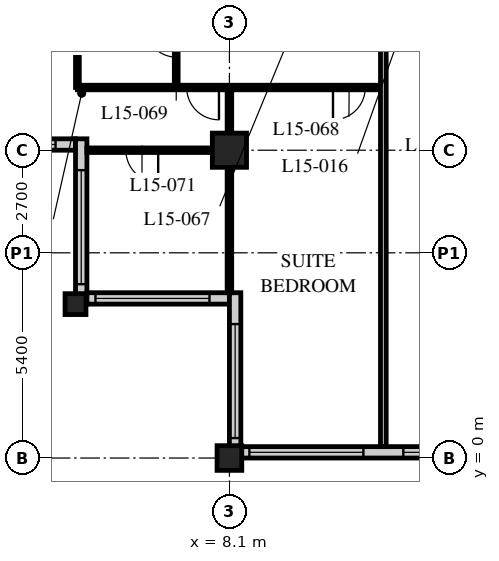
"""IFC4 building model, lengths in metres.
Left out: names, types, materials, properties, quantities, classifications, styles, units other than length and angle.
Written with IfcOpenShell. Run it as: python <this file> out.ifc"""

import sys

from ifc_helpers import new_model, si_unit, direction, frame, frame_2d, origin, origin_2d, place, context, subcontext, project, spatial, rectangle, hollow_rectangle, extrude, element, fill, save


model = new_model("IFC4")
c1 = context("Model", 3, precision=1e-05, world=origin(), true_north=direction((0.0, 1.0)))
c2 = subcontext(c1, "Body", "Model", "MODEL_VIEW")
j1 = project(units=[si_unit("LENGTHUNIT", "METRE"), si_unit("PLANEANGLEUNIT", "RADIAN")], contexts=[c1])
p1 = place(None, origin())
s1 = spatial("IfcSite", under=j1, at=p1, CompositionType="ELEMENT")
p2 = place(p1, origin())
s2 = spatial("IfcBuilding", under=s1, at=p2, CompositionType="ELEMENT")
p3 = place(p2, frame((0.0, 0.0, 63.6)))
s3 = spatial("IfcBuildingStorey", under=s2, at=p3, CompositionType="ELEMENT", Elevation=63.6)
p4 = place(p3, frame((4.05, 4.05, 0.0), z_axis=(0.0, 0.0, 1.0), x_axis=(1.0, 0.0, 0.0)))
e1 = element("IfcColumn", 1, at=p4, inside=s3, PredefinedType="COLUMN", context=c2, shape_type="SweptSolid", body=[
    extrude(hollow_rectangle(XDim=0.55, YDim=0.55, WallThickness=0.05, at=origin_2d()), origin(), (0.0, 0.0, 1.0), 3.4),
])
p5 = place(p3, frame((8.1, 0.0, 0.0), z_axis=(0.0, 0.0, 1.0), x_axis=(1.0, 0.0, 0.0)))
e2 = element("IfcColumn", 2, at=p5, inside=s3, PredefinedType="COLUMN", context=c2, shape_type="SweptSolid", body=[
    extrude(hollow_rectangle(XDim=0.65, YDim=0.65, WallThickness=0.05, at=origin_2d()), origin(), (0.0, 0.0, 1.0), 3.4),
])
p6 = place(p3, frame((8.1, 8.1, 0.0), z_axis=(0.0, 0.0, 1.0), x_axis=(1.0, 0.0, 0.0)))
e3 = element("IfcColumn", 3, at=p6, inside=s3, PredefinedType="COLUMN", context=c2, shape_type="SweptSolid", body=[
    extrude(hollow_rectangle(XDim=0.9, YDim=0.9, WallThickness=0.09, at=origin_2d()), origin(), (0.0, 0.0, 1.0), 3.4),
])
p7 = place(p3, frame((8.4, 0.15, 0.0), z_axis=(0.0, 0.0, 1.0), x_axis=(1.0, 0.0, 0.0)))
e4 = element("IfcWall", 4, at=p7, inside=s3, PredefinedType="SOLIDWALL", context=c2, shape_type="SweptSolid", body=[
    extrude(rectangle(XDim=40.2, YDim=0.3, at=frame_2d((20.1, 0.0))), origin(), (0.0, 0.0, 1.0), 3.19),
])
p8 = place(p7, frame((0.225, 0.0, 0.9)))
e5 = element("IfcOpeningElement", 5, at=p8, cuts=e4, PredefinedType="OPENING", context=c2, shape_type="SweptSolid", body=[
    extrude(rectangle(XDim=3.0, YDim=2.0, at=frame_2d((1.5, 1.0))), frame((0.0, 0.16, 0.0), z_axis=(0.0, -1.0, 0.0), x_axis=(1.0, 0.0, 0.0)), (0.0, 0.0, 1.0), 0.32),
])
p9 = place(p7, frame((4.275, 0.0, 0.9)))
e6 = element("IfcOpeningElement", 6, at=p9, cuts=e4, PredefinedType="OPENING", context=c2, shape_type="SweptSolid", body=[
    extrude(rectangle(XDim=3.0, YDim=2.0, at=frame_2d((1.5, 1.0))), frame((0.0, 0.16, 0.0), z_axis=(0.0, -1.0, 0.0), x_axis=(1.0, 0.0, 0.0)), (0.0, 0.0, 1.0), 0.32),
])
p10 = place(p7, frame((8.325, 0.0, 0.9)))
e7 = element("IfcOpeningElement", 7, at=p10, cuts=e4, PredefinedType="OPENING", context=c2, shape_type="SweptSolid", body=[
    extrude(rectangle(XDim=3.0, YDim=2.0, at=frame_2d((1.5, 1.0))), frame((0.0, 0.16, 0.0), z_axis=(0.0, -1.0, 0.0), x_axis=(1.0, 0.0, 0.0)), (0.0, 0.0, 1.0), 0.32),
])
p11 = place(p7, frame((12.375, 0.0, 0.9)))
e8 = element("IfcOpeningElement", 8, at=p11, cuts=e4, PredefinedType="OPENING", context=c2, shape_type="SweptSolid", body=[
    extrude(rectangle(XDim=3.0, YDim=2.0, at=frame_2d((1.5, 1.0))), frame((0.0, 0.16, 0.0), z_axis=(0.0, -1.0, 0.0), x_axis=(1.0, 0.0, 0.0)), (0.0, 0.0, 1.0), 0.32),
])
p12 = place(p7, frame((16.425, 0.0, 0.9)))
e9 = element("IfcOpeningElement", 9, at=p12, cuts=e4, PredefinedType="OPENING", context=c2, shape_type="SweptSolid", body=[
    extrude(rectangle(XDim=3.0, YDim=2.0, at=frame_2d((1.5, 1.0))), frame((0.0, 0.16, 0.0), z_axis=(0.0, -1.0, 0.0), x_axis=(1.0, 0.0, 0.0)), (0.0, 0.0, 1.0), 0.32),
])
p13 = place(p7, frame((20.475, 0.0, 0.9)))
e10 = element("IfcOpeningElement", 10, at=p13, cuts=e4, PredefinedType="OPENING", context=c2, shape_type="SweptSolid", body=[
    extrude(rectangle(XDim=3.0, YDim=2.0, at=frame_2d((1.5, 1.0))), frame((0.0, 0.16, 0.0), z_axis=(0.0, -1.0, 0.0), x_axis=(1.0, 0.0, 0.0)), (0.0, 0.0, 1.0), 0.32),
])
p14 = place(p7, frame((24.525, 0.0, 0.9)))
e11 = element("IfcOpeningElement", 11, at=p14, cuts=e4, PredefinedType="OPENING", context=c2, shape_type="SweptSolid", body=[
    extrude(rectangle(XDim=3.0, YDim=2.0, at=frame_2d((1.5, 1.0))), frame((0.0, 0.16, 0.0), z_axis=(0.0, -1.0, 0.0), x_axis=(1.0, 0.0, 0.0)), (0.0, 0.0, 1.0), 0.32),
])
p15 = place(p7, frame((28.575, 0.0, 0.9)))
e12 = element("IfcOpeningElement", 12, at=p15, cuts=e4, PredefinedType="OPENING", context=c2, shape_type="SweptSolid", body=[
    extrude(rectangle(XDim=3.0, YDim=2.0, at=frame_2d((1.5, 1.0))), frame((0.0, 0.16, 0.0), z_axis=(0.0, -1.0, 0.0), x_axis=(1.0, 0.0, 0.0)), (0.0, 0.0, 1.0), 0.32),
])
p16 = place(p7, frame((32.625, 0.0, 0.9)))
e13 = element("IfcOpeningElement", 13, at=p16, cuts=e4, PredefinedType="OPENING", context=c2, shape_type="SweptSolid", body=[
    extrude(rectangle(XDim=3.0, YDim=2.0, at=frame_2d((1.5, 1.0))), frame((0.0, 0.16, 0.0), z_axis=(0.0, -1.0, 0.0), x_axis=(1.0, 0.0, 0.0)), (0.0, 0.0, 1.0), 0.32),
])
p17 = place(p7, frame((36.675, 0.0, 0.9)))
e14 = element("IfcOpeningElement", 14, at=p17, cuts=e4, PredefinedType="OPENING", context=c2, shape_type="SweptSolid", body=[
    extrude(rectangle(XDim=3.0, YDim=2.0, at=frame_2d((1.5, 1.0))), frame((0.0, 0.16, 0.0), z_axis=(0.0, -1.0, 0.0), x_axis=(1.0, 0.0, 0.0)), (0.0, 0.0, 1.0), 0.32),
])
p18 = place(p3, frame((0.3, 8.25, 0.0), z_axis=(0.0, 0.0, 1.0), x_axis=(1.0, 0.0, 0.0)))
e15 = element("IfcWall", 15, at=p18, inside=s3, PredefinedType="SOLIDWALL", context=c2, shape_type="SweptSolid", body=[
    extrude(rectangle(XDim=3.75, YDim=0.3, at=frame_2d((1.875, 0.0))), origin(), (0.0, 0.0, 1.0), 3.19),
])
p19 = place(p18, frame((0.225, 0.0, 0.9)))
e16 = element("IfcOpeningElement", 16, at=p19, cuts=e15, PredefinedType="OPENING", context=c2, shape_type="SweptSolid", body=[
    extrude(rectangle(XDim=3.0, YDim=1.5, at=frame_2d((1.5, 0.75))), frame((0.0, 0.16, 0.0), z_axis=(0.0, -1.0, 0.0), x_axis=(1.0, 0.0, 0.0)), (0.0, 0.0, 1.0), 0.32),
])
p20 = place(p3, frame((4.2, 8.4, 0.0), z_axis=(0.0, 0.0, 1.0), x_axis=(0.0, -1.0, 0.0)))
e17 = element("IfcWall", 17, at=p20, inside=s3, PredefinedType="SOLIDWALL", context=c2, shape_type="SweptSolid", body=[
    extrude(rectangle(XDim=4.35, YDim=0.3, at=frame_2d((2.175, 0.0))), origin(), (0.0, 0.0, 1.0), 3.19),
])
p21 = place(p20, frame((0.825, 0.0, 0.9)))
e18 = element("IfcOpeningElement", 18, at=p21, cuts=e17, PredefinedType="OPENING", context=c2, shape_type="SweptSolid", body=[
    extrude(rectangle(XDim=3.0, YDim=1.5, at=frame_2d((1.5, 0.75))), frame((0.0, 0.16, 0.0), z_axis=(0.0, -1.0, 0.0), x_axis=(1.0, 0.0, 0.0)), (0.0, 0.0, 1.0), 0.32),
])
p22 = place(p3, frame((4.35, 4.2, 0.0), z_axis=(0.0, 0.0, 1.0), x_axis=(1.0, 0.0, 0.0)))
e19 = element("IfcWall", 19, at=p22, inside=s3, PredefinedType="SOLIDWALL", context=c2, shape_type="SweptSolid", body=[
    extrude(rectangle(XDim=3.75, YDim=0.3, at=frame_2d((1.875, 0.0))), origin(), (0.0, 0.0, 1.0), 3.19),
])
p23 = place(p22, frame((0.225, 0.0, 0.9)))
e20 = element("IfcOpeningElement", 20, at=p23, cuts=e19, PredefinedType="OPENING", context=c2, shape_type="SweptSolid", body=[
    extrude(rectangle(XDim=3.0, YDim=1.5, at=frame_2d((1.5, 0.75))), frame((0.0, 0.16, 0.0), z_axis=(0.0, -1.0, 0.0), x_axis=(1.0, 0.0, 0.0)), (0.0, 0.0, 1.0), 0.32),
])
p24 = place(p3, frame((8.25, 4.35, 0.0), z_axis=(0.0, 0.0, 1.0), x_axis=(0.0, -1.0, 0.0)))
e21 = element("IfcWall", 21, at=p24, inside=s3, PredefinedType="SOLIDWALL", context=c2, shape_type="SweptSolid", body=[
    extrude(rectangle(XDim=4.35, YDim=0.3, at=frame_2d((2.175, 0.0))), origin(), (0.0, 0.0, 1.0), 3.19),
])
p25 = place(p24, frame((0.825, 0.0, 0.9)))
e22 = element("IfcOpeningElement", 22, at=p25, cuts=e21, PredefinedType="OPENING", context=c2, shape_type="SweptSolid", body=[
    extrude(rectangle(XDim=3.0, YDim=1.5, at=frame_2d((1.5, 0.75))), frame((0.0, 0.16, 0.0), z_axis=(0.0, -1.0, 0.0), x_axis=(1.0, 0.0, 0.0)), (0.0, 0.0, 1.0), 0.32),
])
p26 = place(p3, frame((6.7, 12.15, 0.0), z_axis=(0.0, 0.0, 1.0), x_axis=(0.0, -1.0, 0.0)))
e23 = element("IfcWall", 23, at=p26, inside=s3, PredefinedType="PARTITIONING", context=c2, shape_type="SweptSolid", body=[
    extrude(rectangle(XDim=2.4, YDim=0.1, at=frame_2d((1.2, 0.0))), origin(), (0.0, 0.0, 1.0), 3.19),
])
p27 = place(p26, frame((0.8, 0.0, 0.0)))
e24 = element("IfcOpeningElement", 24, at=p27, cuts=e23, PredefinedType="OPENING", context=c2, shape_type="SweptSolid", body=[
    extrude(rectangle(XDim=0.8, YDim=2.1, at=frame_2d((0.4, 1.05))), frame((0.0, 0.06, 0.0), z_axis=(0.0, -1.0, 0.0), x_axis=(1.0, 0.0, 0.0)), (0.0, 0.0, 1.0), 0.12),
])
p28 = place(p3, frame((4.1, 12.15, 0.0), z_axis=(0.0, 0.0, 1.0), x_axis=(0.0, -1.0, 0.0)))
e25 = element("IfcWall", 25, at=p28, inside=s3, PredefinedType="PARTITIONING", context=c2, shape_type="SweptSolid", body=[
    extrude(rectangle(XDim=2.4, YDim=0.1, at=frame_2d((1.2, 0.0))), origin(), (0.0, 0.0, 1.0), 3.19),
])
p29 = place(p3, frame((4.1, 9.75, 0.0), z_axis=(0.0, 0.0, 1.0), x_axis=(1.0, 0.0, 0.0)))
e26 = element("IfcWall", 26, at=p29, inside=s3, PredefinedType="PARTITIONING", context=c2, shape_type="SweptSolid", body=[
    extrude(rectangle(XDim=8.05, YDim=0.12, at=frame_2d((4.025, 0.0))), origin(), (0.0, 0.0, 1.0), 3.19),
])
p30 = place(p29, frame((6.725, 0.0, 0.0)))
e27 = element("IfcOpeningElement", 27, at=p30, cuts=e26, PredefinedType="OPENING", context=c2, shape_type="SweptSolid", body=[
    extrude(rectangle(XDim=0.85, YDim=2.1, at=frame_2d((0.425, 1.05))), frame((0.0, 0.07, 0.0), z_axis=(0.0, -1.0, 0.0), x_axis=(1.0, 0.0, 0.0)), (0.0, 0.0, 1.0), 0.14),
])
p31 = place(p29, frame((2.875, 0.0, 0.0)))
e28 = element("IfcOpeningElement", 28, at=p31, cuts=e26, PredefinedType="OPENING", context=c2, shape_type="SweptSolid", body=[
    extrude(rectangle(XDim=0.85, YDim=2.1, at=frame_2d((0.425, 1.05))), frame((0.0, 0.07, 0.0), z_axis=(0.0, -1.0, 0.0), x_axis=(1.0, 0.0, 0.0)), (0.0, 0.0, 1.0), 0.14),
])
p32 = place(p3, frame((8.1, 9.75, 0.0), z_axis=(0.0, 0.0, 1.0), x_axis=(0.0, -1.0, 0.0)))
e29 = element("IfcWall", 29, at=p32, inside=s3, PredefinedType="PARTITIONING", context=c2, shape_type="SweptSolid", body=[
    extrude(rectangle(XDim=5.4, YDim=0.12, at=frame_2d((2.7, 0.0))), origin(), (0.0, 0.0, 1.0), 2.578),
])
p33 = place(p3, frame((8.1, 8.1, 0.0), z_axis=(0.0, 0.0, 1.0), x_axis=(-1.0, 0.0, 0.0)))
e30 = element("IfcWall", 30, at=p33, inside=s3, PredefinedType="PARTITIONING", context=c2, shape_type="SweptSolid", body=[
    extrude(rectangle(XDim=3.75, YDim=0.12, at=frame_2d((1.875, 0.0))), origin(), (0.0, 0.0, 1.0), 2.578),
])
p34 = place(p33, frame((1.875, 0.0, 0.0)))
e31 = element("IfcOpeningElement", 31, at=p34, cuts=e30, PredefinedType="OPENING", context=c2, shape_type="SweptSolid", body=[
    extrude(rectangle(XDim=0.85, YDim=2.1, at=frame_2d((0.425, 1.05))), frame((0.0, 0.07, 0.0), z_axis=(0.0, -1.0, 0.0), x_axis=(1.0, 0.0, 0.0)), (0.0, 0.0, 1.0), 0.14),
])
p35 = place(p3, frame((12.15, 12.15, 0.0), z_axis=(0.0, 0.0, 1.0), x_axis=(0.0, -1.0, 0.0)))
e32 = element("IfcWall", 32, at=p35, inside=s3, PredefinedType="PARTITIONING", context=c2, shape_type="SweptSolid", body=[
    extrude(rectangle(XDim=11.85, YDim=0.15, at=frame_2d((5.925, 0.0))), origin(), (0.0, 0.0, 1.0), 3.19),
])
p36 = place(p8, origin())
e33 = element("IfcWindow", 33, at=p36, inside=s3, PartitioningType="SINGLE_PANEL", PredefinedType="WINDOW", context=c2, shape_type="SweptSolid", body=[
    extrude(rectangle(XDim=3.0, YDim=2.0, at=frame_2d((1.5, 1.0))), frame((0.0, 0.03, 0.0), z_axis=(0.0, -1.0, 0.0), x_axis=(1.0, 0.0, 0.0)), (0.0, 0.0, 1.0), 0.06),
])
fill(e5, e33)
p37 = place(p9, origin())
e34 = element("IfcWindow", 34, at=p37, inside=s3, PartitioningType="SINGLE_PANEL", PredefinedType="WINDOW", context=c2, shape_type="SweptSolid", body=[
    extrude(rectangle(XDim=3.0, YDim=2.0, at=frame_2d((1.5, 1.0))), frame((0.0, 0.03, 0.0), z_axis=(0.0, -1.0, 0.0), x_axis=(1.0, 0.0, 0.0)), (0.0, 0.0, 1.0), 0.06),
])
fill(e6, e34)
p38 = place(p19, origin())
e35 = element("IfcWindow", 35, at=p38, inside=s3, PartitioningType="SINGLE_PANEL", PredefinedType="WINDOW", context=c2, shape_type="SweptSolid", body=[
    extrude(rectangle(XDim=3.0, YDim=1.5, at=frame_2d((1.5, 0.75))), frame((0.0, 0.03, 0.0), z_axis=(0.0, -1.0, 0.0), x_axis=(1.0, 0.0, 0.0)), (0.0, 0.0, 1.0), 0.06),
])
fill(e16, e35)
p39 = place(p21, origin())
e36 = element("IfcWindow", 36, at=p39, inside=s3, PartitioningType="SINGLE_PANEL", PredefinedType="WINDOW", context=c2, shape_type="SweptSolid", body=[
    extrude(rectangle(XDim=3.0, YDim=1.5, at=frame_2d((1.5, 0.75))), frame((0.0, 0.03, 0.0), z_axis=(0.0, -1.0, 0.0), x_axis=(1.0, 0.0, 0.0)), (0.0, 0.0, 1.0), 0.06),
])
fill(e18, e36)
p40 = place(p23, origin())
e37 = element("IfcWindow", 37, at=p40, inside=s3, PartitioningType="SINGLE_PANEL", PredefinedType="WINDOW", context=c2, shape_type="SweptSolid", body=[
    extrude(rectangle(XDim=3.0, YDim=1.5, at=frame_2d((1.5, 0.75))), frame((0.0, 0.03, 0.0), z_axis=(0.0, -1.0, 0.0), x_axis=(1.0, 0.0, 0.0)), (0.0, 0.0, 1.0), 0.06),
])
fill(e20, e37)
p41 = place(p25, origin())
e38 = element("IfcWindow", 38, at=p41, inside=s3, PartitioningType="SINGLE_PANEL", PredefinedType="WINDOW", context=c2, shape_type="SweptSolid", body=[
    extrude(rectangle(XDim=3.0, YDim=1.5, at=frame_2d((1.5, 0.75))), frame((0.0, 0.03, 0.0), z_axis=(0.0, -1.0, 0.0), x_axis=(1.0, 0.0, 0.0)), (0.0, 0.0, 1.0), 0.06),
])
fill(e22, e38)
p42 = place(p30, origin())
e39 = element("IfcDoor", 39, at=p42, inside=s3, OperationType="SINGLE_SWING_RIGHT", PredefinedType="DOOR", context=c2, shape_type="SweptSolid", body=[
    extrude(rectangle(XDim=0.85, YDim=2.1, at=frame_2d((0.425, 1.05))), frame((0.0, 0.025, 0.0), z_axis=(0.0, -1.0, 0.0), x_axis=(1.0, 0.0, 0.0)), (0.0, 0.0, 1.0), 0.05),
])
fill(e27, e39)
p43 = place(p27, origin())
e40 = element("IfcDoor", 40, at=p43, inside=s3, OperationType="SINGLE_SWING_RIGHT", PredefinedType="DOOR", context=c2, shape_type="SweptSolid", body=[
    extrude(rectangle(XDim=0.8, YDim=2.1, at=frame_2d((0.4, 1.05))), frame((0.0, 0.025, 0.0), z_axis=(0.0, -1.0, 0.0), x_axis=(1.0, 0.0, 0.0)), (0.0, 0.0, 1.0), 0.05),
])
fill(e24, e40)
p44 = place(p31, origin())
e41 = element("IfcDoor", 41, at=p44, inside=s3, OperationType="SINGLE_SWING_LEFT", PredefinedType="DOOR", context=c2, shape_type="SweptSolid", body=[
    extrude(rectangle(XDim=0.85, YDim=2.1, at=frame_2d((0.425, 1.05))), frame((0.0, 0.025, 0.0), z_axis=(0.0, -1.0, 0.0), x_axis=(1.0, 0.0, 0.0)), (0.0, 0.0, 1.0), 0.05),
])
fill(e28, e41)
p45 = place(p34, origin())
e42 = element("IfcDoor", 42, at=p45, inside=s3, OperationType="SINGLE_SWING_LEFT", PredefinedType="DOOR", context=c2, shape_type="SweptSolid", body=[
    extrude(rectangle(XDim=0.85, YDim=2.1, at=frame_2d((0.425, 1.05))), frame((0.0, 0.025, 0.0), z_axis=(0.0, -1.0, 0.0), x_axis=(1.0, 0.0, 0.0)), (0.0, 0.0, 1.0), 0.05),
])
fill(e31, e42)
save(model, sys.argv[1])
